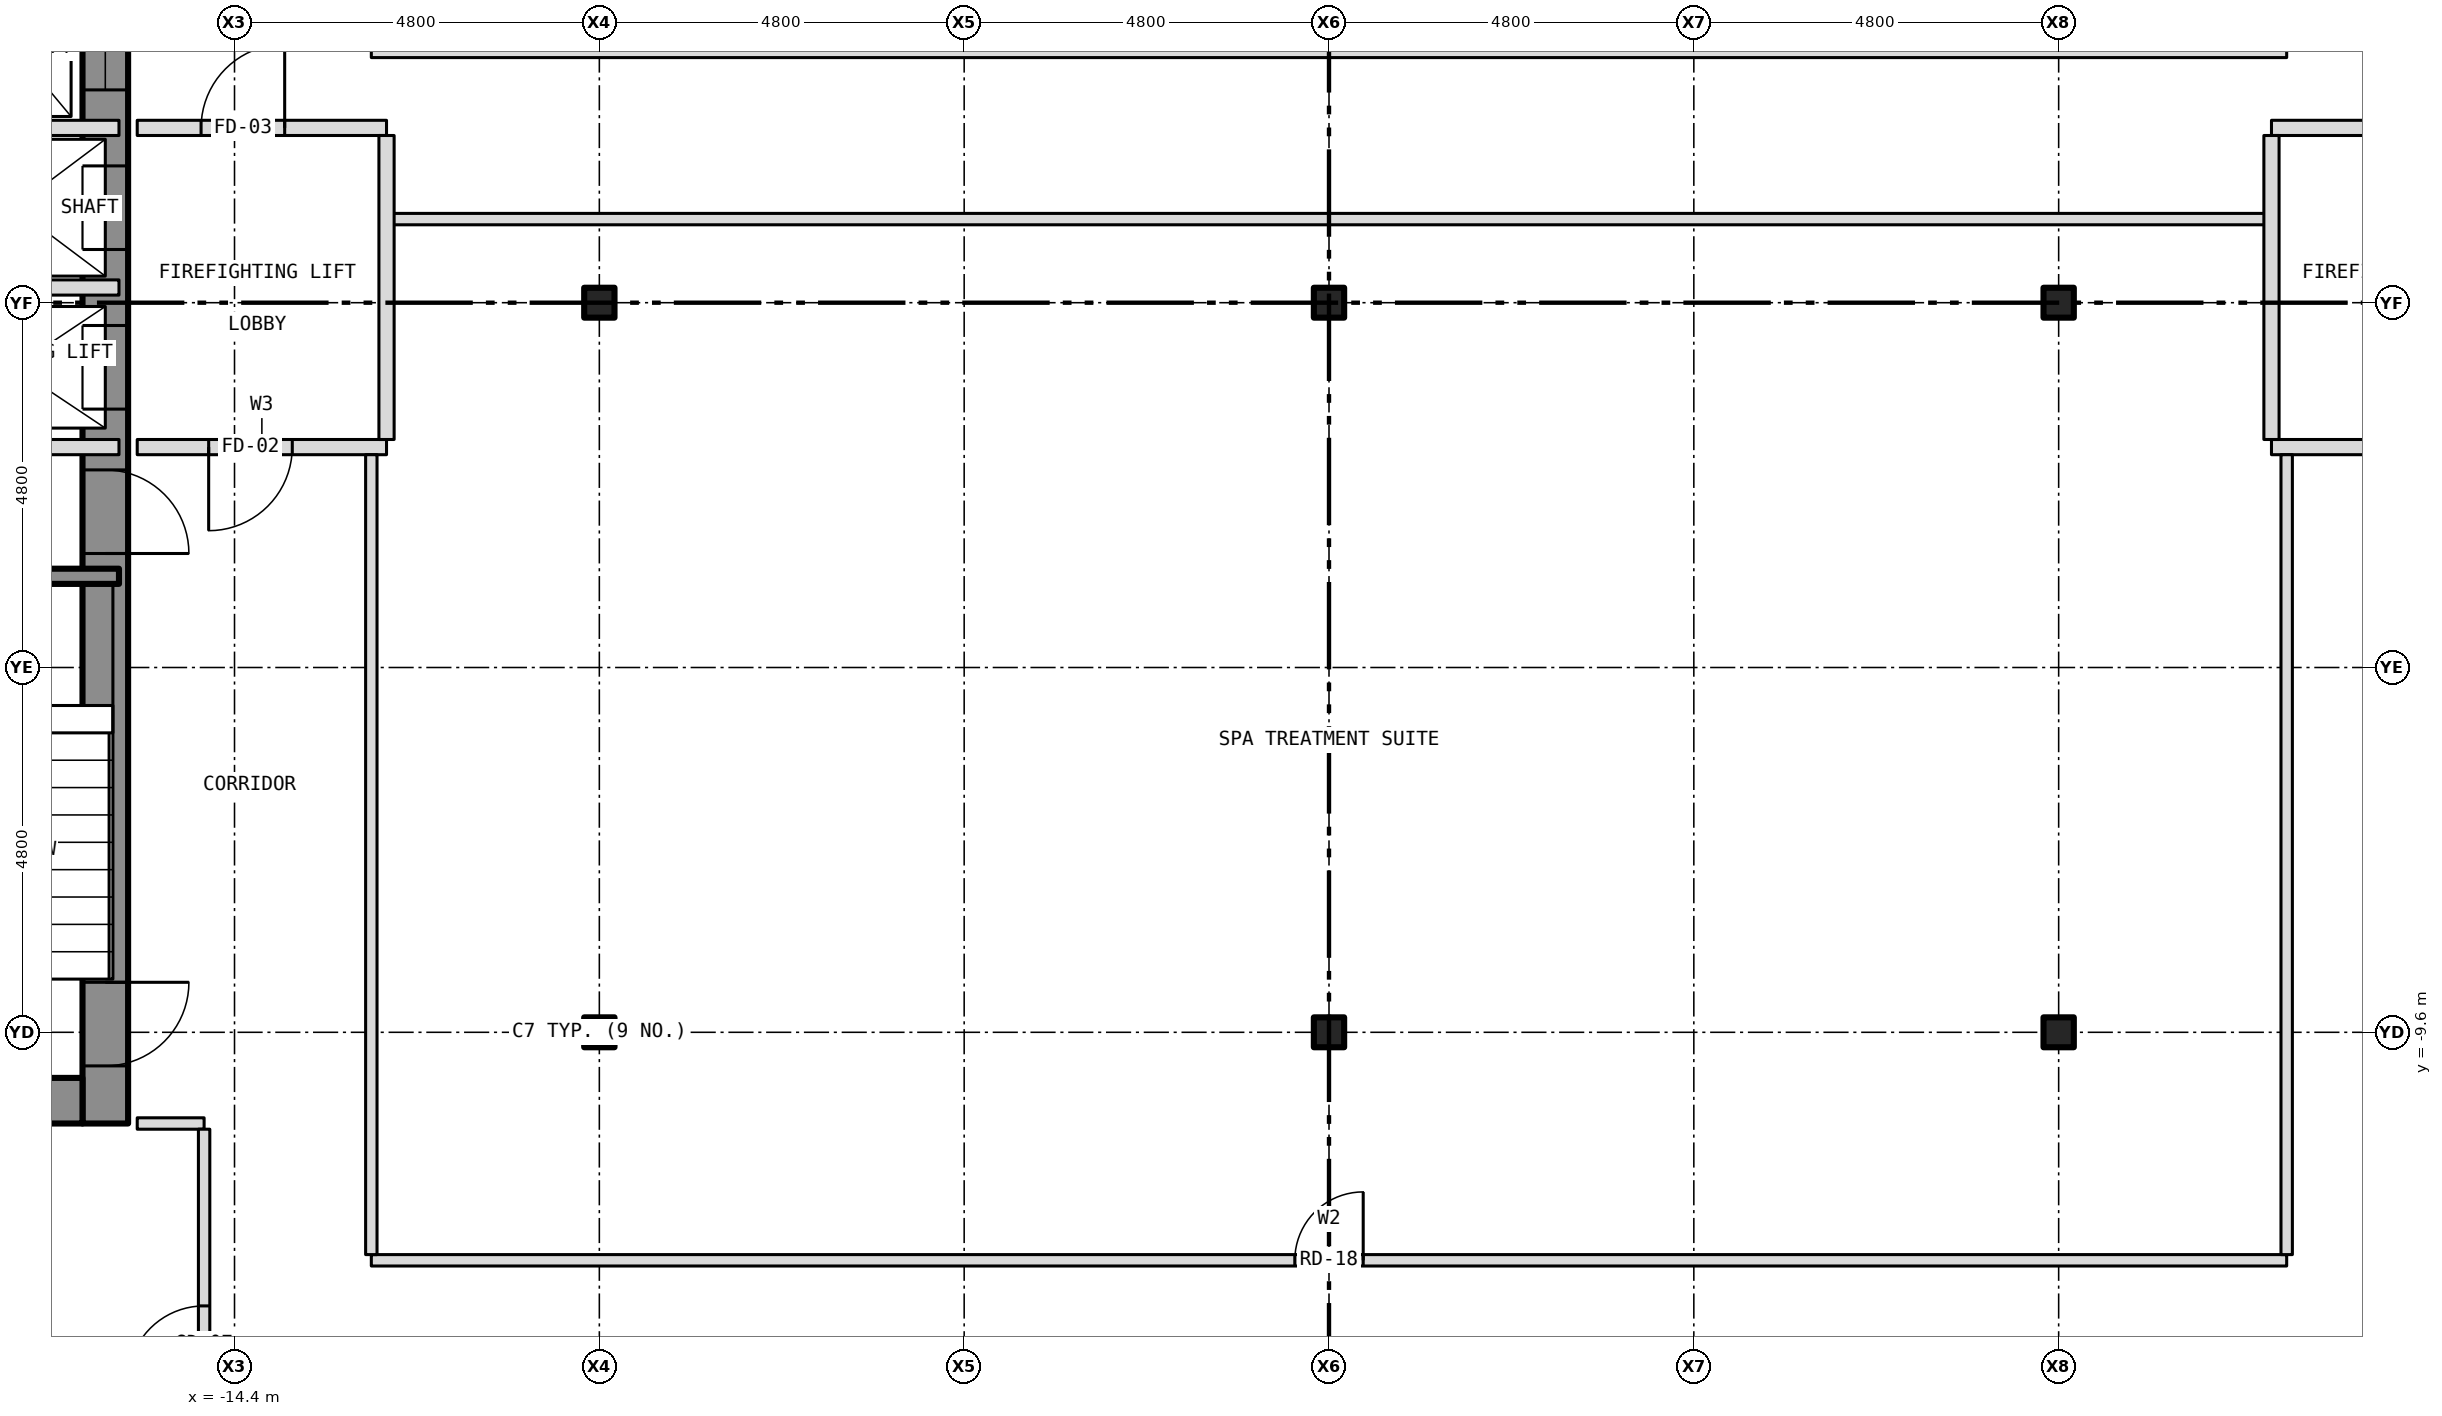
"""IFC4 building model, lengths in metres.
Left out: names, types, materials, properties, quantities, classifications, styles, units other than length and angle.
Written with IfcOpenShell. Run it as: python <this file> out.ifc"""

import sys

from ifc_helpers import new_model, si_unit, direction, frame, frame_2d, origin, origin_2d, place, context, subcontext, project, spatial, rectangle, i_section, extrude, element, fill, save


model = new_model("IFC4")
c1 = context("Model", 3, precision=1e-05, world=origin(), true_north=direction((0.0, 1.0)))
c2 = subcontext(c1, "Body", "Model", "MODEL_VIEW")
j1 = project(units=[si_unit("LENGTHUNIT", "METRE"), si_unit("PLANEANGLEUNIT", "RADIAN")], contexts=[c1])
p1 = place(None, origin())
s1 = spatial("IfcSite", under=j1, at=p1, CompositionType="ELEMENT")
p2 = place(p1, origin())
s2 = spatial("IfcBuilding", under=s1, at=p2, CompositionType="ELEMENT")
p3 = place(p2, frame((0.0, 0.0, 103.0)))
s3 = spatial("IfcBuildingStorey", under=s2, at=p3, CompositionType="ELEMENT", Elevation=103.0)
for number, where, z_axis, x_axis in (
    (1, (-9.6, -9.6, -0.15), (0.0, 0.0, 1.0), (1.0, 0.0, 0.0)),
    (2, (-9.6, 0.0, -0.15), (0.0, 0.0, 1.0), (1.0, 0.0, 0.0)),
    (3, (0.0, -9.6, -0.15), (0.0, 0.0, 1.0), (1.0, 0.0, 0.0)),
    (4, (0.0, 0.0, -0.15), (0.0, 0.0, 1.0), (1.0, 0.0, 0.0)),
    (5, (9.6, -9.6, -0.15), (0.0, 0.0, 1.0), (1.0, 0.0, 0.0)),
    (6, (9.6, 0.0, -0.15), (0.0, 0.0, 1.0), (1.0, 0.0, 0.0)),
):
    element("IfcColumn", number, at=place(p3, frame(where, z_axis=z_axis, x_axis=x_axis)), inside=s3, PredefinedType="COLUMN", context=c2, shape_type="SweptSolid", body=[
        extrude(i_section(OverallWidth=0.399, OverallDepth=0.394, WebThickness=0.023, FlangeThickness=0.037, at=origin_2d()), origin(), (0.0, 0.0, 1.0), 3.5),
    ])
p4 = place(p3, frame((-16.1, -10.8, 0.0), z_axis=(0.0, 0.0, 1.0), x_axis=(0.0, 1.0, 0.0)))
e7 = element("IfcWall", 7, at=p4, inside=s3, PredefinedType="SHEAR", context=c2, shape_type="SweptSolid", body=[
    extrude(rectangle(XDim=21.6, YDim=0.6, at=frame_2d((10.8, 0.0))), origin(), (0.0, 0.0, 1.0), 3.25),
])
p5 = place(p4, frame((9.4, 0.0, 0.0)))
e8 = element("IfcOpeningElement", 8, at=p5, cuts=e7, PredefinedType="OPENING", context=c2, shape_type="SweptSolid", body=[
    extrude(rectangle(XDim=1.1, YDim=2.1, at=frame_2d((0.55, 1.05))), frame((0.0, 0.312, 0.0), z_axis=(0.0, -1.0, 0.0), x_axis=(1.0, 0.0, 0.0)), (0.0, 0.0, 1.0), 0.624),
])
p6 = place(p4, frame((11.5, 0.0, 0.0)))
e9 = element("IfcOpeningElement", 9, at=p6, cuts=e7, PredefinedType="OPENING", context=c2, shape_type="SweptSolid", body=[
    extrude(rectangle(XDim=1.1, YDim=2.1, at=frame_2d((0.55, 1.05))), frame((0.0, 0.312, 0.0), z_axis=(0.0, -1.0, 0.0), x_axis=(1.0, 0.0, 0.0)), (0.0, 0.0, 1.0), 0.624),
])
p7 = place(p4, frame((13.6, 0.0, 0.0)))
e10 = element("IfcOpeningElement", 10, at=p7, cuts=e7, PredefinedType="OPENING", context=c2, shape_type="SweptSolid", body=[
    extrude(rectangle(XDim=1.1, YDim=2.1, at=frame_2d((0.55, 1.05))), frame((0.0, 0.312, 0.0), z_axis=(0.0, -1.0, 0.0), x_axis=(1.0, 0.0, 0.0)), (0.0, 0.0, 1.0), 0.624),
])
p8 = place(p4, frame((15.7, 0.0, 0.0)))
e11 = element("IfcOpeningElement", 11, at=p8, cuts=e7, PredefinedType="OPENING", context=c2, shape_type="SweptSolid", body=[
    extrude(rectangle(XDim=1.1, YDim=2.1, at=frame_2d((0.55, 1.05))), frame((0.0, 0.312, 0.0), z_axis=(0.0, -1.0, 0.0), x_axis=(1.0, 0.0, 0.0)), (0.0, 0.0, 1.0), 0.624),
])
p9 = place(p4, frame((17.8, 0.0, 0.0)))
e12 = element("IfcOpeningElement", 12, at=p9, cuts=e7, PredefinedType="OPENING", context=c2, shape_type="SweptSolid", body=[
    extrude(rectangle(XDim=1.1, YDim=2.1, at=frame_2d((0.55, 1.05))), frame((0.0, 0.312, 0.0), z_axis=(0.0, -1.0, 0.0), x_axis=(1.0, 0.0, 0.0)), (0.0, 0.0, 1.0), 0.624),
])
p10 = place(p4, frame((0.758, 0.0, 0.0)))
e13 = element("IfcOpeningElement", 13, at=p10, cuts=e7, PredefinedType="OPENING", context=c2, shape_type="SweptSolid", body=[
    extrude(rectangle(XDim=1.1, YDim=2.1, at=frame_2d((0.55, 1.05))), frame((0.0, 0.312, 0.0), z_axis=(0.0, -1.0, 0.0), x_axis=(1.0, 0.0, 0.0)), (0.0, 0.0, 1.0), 0.624),
])
p11 = place(p4, frame((7.5, 0.0, 0.0)))
e14 = element("IfcOpeningElement", 14, at=p11, cuts=e7, PredefinedType="OPENING", context=c2, shape_type="SweptSolid", body=[
    extrude(rectangle(XDim=1.1, YDim=2.1, at=frame_2d((0.55, 1.05))), frame((0.0, 0.312, 0.0), z_axis=(0.0, -1.0, 0.0), x_axis=(1.0, 0.0, 0.0)), (0.0, 0.0, 1.0), 0.624),
])
p12 = place(p3, frame((-22.2, -10.5, 0.0), z_axis=(0.0, 0.0, 1.0), x_axis=(1.0, 0.0, 0.0)))
e15 = element("IfcWall", 15, at=p12, inside=s3, PredefinedType="SHEAR", context=c2, shape_type="SweptSolid", body=[
    extrude(rectangle(XDim=5.8, YDim=0.6, at=frame_2d((2.9, 0.0))), origin(), (0.0, 0.0, 1.0), 3.25),
])
p13 = place(p3, frame((-12.6, -12.6, 0.0), z_axis=(0.0, 0.0, 1.0), x_axis=(1.0, 0.0, 0.0)))
e16 = element("IfcWall", 16, at=p13, inside=s3, PredefinedType="PARTITIONING", context=c2, shape_type="SweptSolid", body=[
    extrude(rectangle(XDim=25.2, YDim=0.15, at=frame_2d((12.6, 0.0))), origin(), (0.0, 0.0, 1.0), 3.35),
])
p14 = place(p13, frame((12.15, 0.0, 0.0)))
e17 = element("IfcOpeningElement", 17, at=p14, cuts=e16, PredefinedType="OPENING", context=c2, shape_type="SweptSolid", body=[
    extrude(rectangle(XDim=0.9, YDim=2.1, at=frame_2d((0.45, 1.05))), frame((0.0, 0.087, 0.0), z_axis=(0.0, -1.0, 0.0), x_axis=(1.0, 0.0, 0.0)), (0.0, 0.0, 1.0), 0.174),
])
p15 = place(p3, frame((-15.68, -10.8, 0.0), z_axis=(0.0, 0.0, 1.0), x_axis=(1.0, 0.0, 0.0)))
e18 = element("IfcWall", 18, at=p15, inside=s3, PredefinedType="PARTITIONING", context=c2, shape_type="SweptSolid", body=[
    extrude(rectangle(XDim=0.88, YDim=0.15, at=frame_2d((0.44, 0.0))), origin(), (0.0, 0.0, 1.0), 3.35),
])
p16 = place(p3, frame((-20.0, -3.6, 0.0), z_axis=(0.0, 0.0, 1.0), x_axis=(1.0, 0.0, 0.0)))
e19 = element("IfcWall", 19, at=p16, inside=s3, PredefinedType="SHEAR", context=c2, shape_type="SweptSolid", body=[
    extrude(rectangle(XDim=4.08, YDim=0.2, at=frame_2d((2.04, 0.0))), origin(), (0.0, 0.0, 1.0), 3.25),
])
p17 = place(p3, frame((-22.68, -1.9, 0.0), z_axis=(0.0, 0.0, 1.0), x_axis=(1.0, 0.0, 0.0)))
e20 = element("IfcWall", 20, at=p17, inside=s3, PredefinedType="PARTITIONING", context=c2, shape_type="SweptSolid", body=[
    extrude(rectangle(XDim=6.76, YDim=0.2, at=frame_2d((3.38, 0.0))), origin(), (0.0, 0.0, 1.0), 3.25),
])
p18 = place(p17, frame((2.12, 0.0, 0.0)))
e21 = element("IfcOpeningElement", 21, at=p18, cuts=e20, PredefinedType="OPENING", context=c2, shape_type="SweptSolid", body=[
    extrude(rectangle(XDim=0.9, YDim=2.1, at=frame_2d((0.45, 1.05))), frame((0.0, 0.112, 0.0), z_axis=(0.0, -1.0, 0.0), x_axis=(1.0, 0.0, 0.0)), (0.0, 0.0, 1.0), 0.224),
])
p19 = place(p3, frame((-15.68, -1.9, 0.0), z_axis=(0.0, 0.0, 1.0), x_axis=(1.0, 0.0, 0.0)))
e22 = element("IfcWall", 22, at=p19, inside=s3, PredefinedType="PARTITIONING", context=c2, shape_type="SweptSolid", body=[
    extrude(rectangle(XDim=3.28, YDim=0.2, at=frame_2d((1.64, 0.0))), origin(), (0.0, 0.0, 1.0), 3.35),
])
p20 = place(p19, frame((0.94, 0.0, 0.0)))
e23 = element("IfcOpeningElement", 23, at=p20, cuts=e22, PredefinedType="OPENING", context=c2, shape_type="SweptSolid", body=[
    extrude(rectangle(XDim=1.1, YDim=2.1, at=frame_2d((0.55, 1.05))), frame((0.0, 0.112, 0.0), z_axis=(0.0, -1.0, 0.0), x_axis=(1.0, 0.0, 0.0)), (0.0, 0.0, 1.0), 0.224),
])
p21 = place(p3, frame((12.4, -1.9, 0.0), z_axis=(0.0, 0.0, 1.0), x_axis=(1.0, 0.0, 0.0)))
e24 = element("IfcWall", 24, at=p21, inside=s3, PredefinedType="PARTITIONING", context=c2, shape_type="SweptSolid", body=[
    extrude(rectangle(XDim=3.28, YDim=0.2, at=frame_2d((1.64, 0.0))), origin(), (0.0, 0.0, 1.0), 3.35),
])
p22 = place(p21, frame((1.24, 0.0, 0.0)))
e25 = element("IfcOpeningElement", 25, at=p22, cuts=e24, PredefinedType="OPENING", context=c2, shape_type="SweptSolid", body=[
    extrude(rectangle(XDim=1.1, YDim=2.1, at=frame_2d((0.55, 1.05))), frame((0.0, 0.112, 0.0), z_axis=(0.0, -1.0, 0.0), x_axis=(1.0, 0.0, 0.0)), (0.0, 0.0, 1.0), 0.224),
])
p23 = place(p3, frame((-18.8, 0.2, 0.0), z_axis=(0.0, 0.0, 1.0), x_axis=(1.0, 0.0, 0.0)))
e26 = element("IfcWall", 26, at=p23, inside=s3, PredefinedType="PARTITIONING", context=c2, shape_type="SweptSolid", body=[
    extrude(rectangle(XDim=2.88, YDim=0.2, at=frame_2d((1.44, 0.0))), origin(), (0.0, 0.0, 1.0), 3.25),
])
p24 = place(p3, frame((-12.4, 1.1, 0.0), z_axis=(0.0, 0.0, 1.0), x_axis=(1.0, 0.0, 0.0)))
e27 = element("IfcWall", 27, at=p24, inside=s3, PredefinedType="PARTITIONING", context=c2, shape_type="SweptSolid", body=[
    extrude(rectangle(XDim=24.8, YDim=0.15, at=frame_2d((12.4, 0.0))), origin(), (0.0, 0.0, 1.0), 3.35),
])
p25 = place(p3, frame((-18.8, 2.3, 0.0), z_axis=(0.0, 0.0, 1.0), x_axis=(1.0, 0.0, 0.0)))
e28 = element("IfcWall", 28, at=p25, inside=s3, PredefinedType="PARTITIONING", context=c2, shape_type="SweptSolid", body=[
    extrude(rectangle(XDim=2.88, YDim=0.2, at=frame_2d((1.44, 0.0))), origin(), (0.0, 0.0, 1.0), 3.25),
])
p26 = place(p3, frame((-15.68, 2.3, 0.0), z_axis=(0.0, 0.0, 1.0), x_axis=(1.0, 0.0, 0.0)))
e29 = element("IfcWall", 29, at=p26, inside=s3, PredefinedType="PARTITIONING", context=c2, shape_type="SweptSolid", body=[
    extrude(rectangle(XDim=3.28, YDim=0.2, at=frame_2d((1.64, 0.0))), origin(), (0.0, 0.0, 1.0), 3.35),
])
p27 = place(p26, frame((0.84, 0.0, 0.0)))
e30 = element("IfcOpeningElement", 30, at=p27, cuts=e29, PredefinedType="OPENING", context=c2, shape_type="SweptSolid", body=[
    extrude(rectangle(XDim=1.1, YDim=2.1, at=frame_2d((0.55, 1.05))), frame((0.0, 0.112, 0.0), z_axis=(0.0, -1.0, 0.0), x_axis=(1.0, 0.0, 0.0)), (0.0, 0.0, 1.0), 0.224),
])
p28 = place(p3, frame((12.4, 2.3, 0.0), z_axis=(0.0, 0.0, 1.0), x_axis=(1.0, 0.0, 0.0)))
e31 = element("IfcWall", 31, at=p28, inside=s3, PredefinedType="PARTITIONING", context=c2, shape_type="SweptSolid", body=[
    extrude(rectangle(XDim=3.28, YDim=0.2, at=frame_2d((1.64, 0.0))), origin(), (0.0, 0.0, 1.0), 3.35),
])
p29 = place(p28, frame((1.34, 0.0, 0.0)))
e32 = element("IfcOpeningElement", 32, at=p29, cuts=e31, PredefinedType="OPENING", context=c2, shape_type="SweptSolid", body=[
    extrude(rectangle(XDim=1.1, YDim=2.1, at=frame_2d((0.55, 1.05))), frame((0.0, 0.112, 0.0), z_axis=(0.0, -1.0, 0.0), x_axis=(1.0, 0.0, 0.0)), (0.0, 0.0, 1.0), 0.224),
])
p30 = place(p3, frame((-12.6, 3.3, 0.0), z_axis=(0.0, 0.0, 1.0), x_axis=(1.0, 0.0, 0.0)))
e33 = element("IfcWall", 33, at=p30, inside=s3, PredefinedType="PARTITIONING", context=c2, shape_type="SweptSolid", body=[
    extrude(rectangle(XDim=25.2, YDim=0.15, at=frame_2d((12.6, 0.0))), origin(), (0.0, 0.0, 1.0), 3.35),
])
p31 = place(p3, frame((-14.8, -14.725, 0.0), z_axis=(0.0, 0.0, 1.0), x_axis=(0.0, 1.0, 0.0)))
e34 = element("IfcWall", 34, at=p31, inside=s3, PredefinedType="PARTITIONING", context=c2, shape_type="SweptSolid", body=[
    extrude(rectangle(XDim=3.85, YDim=0.15, at=frame_2d((1.925, 0.0))), origin(), (0.0, 0.0, 1.0), 3.35),
])
p32 = place(p31, frame((0.525, 0.0, 0.0)))
e35 = element("IfcOpeningElement", 35, at=p32, cuts=e34, PredefinedType="OPENING", context=c2, shape_type="SweptSolid", body=[
    extrude(rectangle(XDim=1.0, YDim=2.1, at=frame_2d((0.5, 1.05))), frame((0.0, 0.087, 0.0), z_axis=(0.0, -1.0, 0.0), x_axis=(1.0, 0.0, 0.0)), (0.0, 0.0, 1.0), 0.174),
])
p33 = place(p3, frame((-12.6, -12.525, 0.0), z_axis=(0.0, 0.0, 1.0), x_axis=(0.0, 1.0, 0.0)))
e36 = element("IfcWall", 36, at=p33, inside=s3, PredefinedType="PARTITIONING", context=c2, shape_type="SweptSolid", body=[
    extrude(rectangle(XDim=10.525, YDim=0.15, at=frame_2d((5.262, 0.0))), origin(), (0.0, 0.0, 1.0), 3.35),
])
for number, where, z_axis, x_axis in (
    (37, (-12.4, -1.8, 0.0), (0.0, 0.0, 1.0), (0.0, 1.0, 0.0)),
    (38, (12.4, -1.8, 0.0), (0.0, 0.0, 1.0), (0.0, 1.0, 0.0)),
):
    element("IfcWall", number, at=place(p3, frame(where, z_axis=z_axis, x_axis=x_axis)), inside=s3, PredefinedType="PARTITIONING", context=c2, shape_type="SweptSolid", body=[
        extrude(rectangle(XDim=4.0, YDim=0.2, at=frame_2d((2.0, 0.0))), origin(), (0.0, 0.0, 1.0), 3.35),
    ])
p34 = place(p3, frame((12.6, -12.525, 0.0), z_axis=(0.0, 0.0, 1.0), x_axis=(0.0, 1.0, 0.0)))
e39 = element("IfcWall", 39, at=p34, inside=s3, PredefinedType="PARTITIONING", context=c2, shape_type="SweptSolid", body=[
    extrude(rectangle(XDim=10.525, YDim=0.15, at=frame_2d((5.262, 0.0))), origin(), (0.0, 0.0, 1.0), 3.35),
])
p35 = place(p5, origin())
e40 = element("IfcDoor", 40, at=p35, inside=s3, OperationType="SLIDING_TO_LEFT", PredefinedType="DOOR", context=c2, shape_type="SweptSolid", body=[
    extrude(rectangle(XDim=1.1, YDim=2.1, at=frame_2d((0.55, 1.05))), frame((0.0, 0.025, 0.0), z_axis=(0.0, -1.0, 0.0), x_axis=(1.0, 0.0, 0.0)), (0.0, 0.0, 1.0), 0.05),
])
fill(e8, e40)
p36 = place(p6, origin())
e41 = element("IfcDoor", 41, at=p36, inside=s3, OperationType="SLIDING_TO_LEFT", PredefinedType="DOOR", context=c2, shape_type="SweptSolid", body=[
    extrude(rectangle(XDim=1.1, YDim=2.1, at=frame_2d((0.55, 1.05))), frame((0.0, 0.025, 0.0), z_axis=(0.0, -1.0, 0.0), x_axis=(1.0, 0.0, 0.0)), (0.0, 0.0, 1.0), 0.05),
])
fill(e9, e41)
p37 = place(p7, origin())
e42 = element("IfcDoor", 42, at=p37, inside=s3, OperationType="SLIDING_TO_LEFT", PredefinedType="DOOR", context=c2, shape_type="SweptSolid", body=[
    extrude(rectangle(XDim=1.1, YDim=2.1, at=frame_2d((0.55, 1.05))), frame((0.0, 0.025, 0.0), z_axis=(0.0, -1.0, 0.0), x_axis=(1.0, 0.0, 0.0)), (0.0, 0.0, 1.0), 0.05),
])
fill(e10, e42)
p38 = place(p10, origin())
e43 = element("IfcDoor", 43, at=p38, inside=s3, OperationType="SINGLE_SWING_RIGHT", PredefinedType="DOOR", context=c2, shape_type="SweptSolid", body=[
    extrude(rectangle(XDim=1.1, YDim=2.1, at=frame_2d((0.55, 1.05))), frame((0.0, 0.025, 0.0), z_axis=(0.0, -1.0, 0.0), x_axis=(1.0, 0.0, 0.0)), (0.0, 0.0, 1.0), 0.05),
])
fill(e13, e43)
p39 = place(p11, origin())
e44 = element("IfcDoor", 44, at=p39, inside=s3, OperationType="SINGLE_SWING_LEFT", PredefinedType="DOOR", context=c2, shape_type="SweptSolid", body=[
    extrude(rectangle(XDim=1.1, YDim=2.1, at=frame_2d((0.55, 1.05))), frame((0.0, 0.025, 0.0), z_axis=(0.0, -1.0, 0.0), x_axis=(1.0, 0.0, 0.0)), (0.0, 0.0, 1.0), 0.05),
])
fill(e14, e44)
p40 = place(p20, origin())
e45 = element("IfcDoor", 45, at=p40, inside=s3, OperationType="SINGLE_SWING_LEFT", PredefinedType="DOOR", context=c2, shape_type="SweptSolid", body=[
    extrude(rectangle(XDim=1.1, YDim=2.1, at=frame_2d((0.55, 1.05))), frame((0.0, 0.025, 0.0), z_axis=(0.0, -1.0, 0.0), x_axis=(1.0, 0.0, 0.0)), (0.0, 0.0, 1.0), 0.05),
])
fill(e23, e45)
p41 = place(p27, origin())
e46 = element("IfcDoor", 46, at=p41, inside=s3, OperationType="SINGLE_SWING_RIGHT", PredefinedType="DOOR", context=c2, shape_type="SweptSolid", body=[
    extrude(rectangle(XDim=1.1, YDim=2.1, at=frame_2d((0.55, 1.05))), frame((0.0, 0.025, 0.0), z_axis=(0.0, -1.0, 0.0), x_axis=(1.0, 0.0, 0.0)), (0.0, 0.0, 1.0), 0.05),
])
fill(e30, e46)
p42 = place(p32, origin())
e47 = element("IfcDoor", 47, at=p42, inside=s3, OperationType="SINGLE_SWING_LEFT", PredefinedType="DOOR", context=c2, shape_type="SweptSolid", body=[
    extrude(rectangle(XDim=1.0, YDim=2.1, at=frame_2d((0.5, 1.05))), frame((0.0, 0.025, 0.0), z_axis=(0.0, -1.0, 0.0), x_axis=(1.0, 0.0, 0.0)), (0.0, 0.0, 1.0), 0.05),
])
fill(e35, e47)
p43 = place(p14, origin())
e48 = element("IfcDoor", 48, at=p43, inside=s3, OperationType="SINGLE_SWING_RIGHT", PredefinedType="DOOR", context=c2, shape_type="SweptSolid", body=[
    extrude(rectangle(XDim=0.9, YDim=2.1, at=frame_2d((0.45, 1.05))), frame((0.0, 0.025, 0.0), z_axis=(0.0, -1.0, 0.0), x_axis=(1.0, 0.0, 0.0)), (0.0, 0.0, 1.0), 0.05),
])
fill(e17, e48)
save(model, sys.argv[1])
